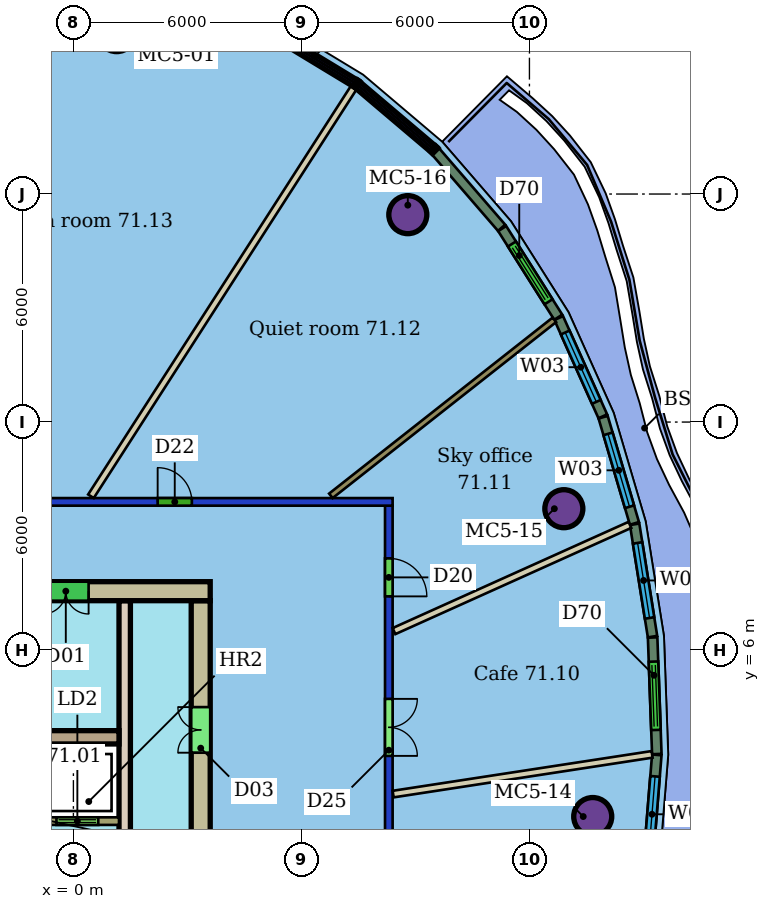
"""IFC4 building model, lengths in metres.
Left out: names, types, materials, properties, quantities, classifications, styles, units other than length and angle.
Written with IfcOpenShell. Run it as: python <this file> out.ifc"""

import sys

from ifc_helpers import new_model, si_unit, direction, frame, frame_2d, origin, origin_2d, place, context, subcontext, project, spatial, rectangle, hollow_circle, extrude, element, fill, save


model = new_model("IFC4")
c1 = context("Model", 3, precision=1e-05, world=origin(), true_north=direction((0.0, 1.0)))
c2 = subcontext(c1, "Body", "Model", "MODEL_VIEW")
j1 = project(units=[si_unit("LENGTHUNIT", "METRE"), si_unit("PLANEANGLEUNIT", "RADIAN")], contexts=[c1])
p1 = place(None, origin())
s1 = spatial("IfcSite", under=j1, at=p1, CompositionType="ELEMENT")
p2 = place(p1, origin())
s2 = spatial("IfcBuilding", under=s1, at=p2, CompositionType="ELEMENT")
p3 = place(p2, frame((0.0, 0.0, 286.5)))
s3 = spatial("IfcBuildingStorey", under=s2, at=p3, CompositionType="ELEMENT", Elevation=286.5)
for number, where, z_axis, x_axis in (
    (1, (13.666, 1.62, 0.0), (0.0, 0.0, 1.0), (1.0, 0.0, 0.0)),
    (2, (12.906, 9.72, 0.0), (0.0, 0.0, 1.0), (1.0, 0.0, 0.0)),
    (3, (8.8, 17.457, 0.0), (0.0, 0.0, 1.0), (1.0, 0.0, 0.0)),
):
    element("IfcColumn", number, at=place(p3, frame(where, z_axis=z_axis, x_axis=x_axis)), inside=s3, PredefinedType="COLUMN", context=c2, shape_type="SweptSolid", body=[
        extrude(hollow_circle(Radius=0.5, WallThickness=0.04, at=origin_2d()), origin(), (0.0, 0.0, 1.0), 3.45),
    ])
p4 = place(p3, frame((-20.4, 9.9, 0.0), z_axis=(0.0, 0.0, 1.0), x_axis=(1.0, 0.0, 0.0)))
e4 = element("IfcWall", 4, at=p4, inside=s3, PredefinedType="PARTITIONING", context=c2, shape_type="SweptSolid", body=[
    extrude(rectangle(XDim=28.8, YDim=0.2, at=frame_2d((14.4, 0.0))), origin(), (0.0, 0.0, 1.0), 3.1),
])
p5 = place(p4, frame((12.171, 0.0, 0.0)))
e5 = element("IfcOpeningElement", 5, at=p5, cuts=e4, PredefinedType="OPENING", context=c2, shape_type="SweptSolid", body=[
    extrude(rectangle(XDim=1.0, YDim=2.4, at=frame_2d((0.5, 1.2))), frame((0.0, 0.11, 0.0), z_axis=(0.0, -1.0, 0.0), x_axis=(1.0, 0.0, 0.0)), (0.0, 0.0, 1.0), 0.22),
])
p6 = place(p4, frame((6.068, 0.0, 0.0)))
e6 = element("IfcOpeningElement", 6, at=p6, cuts=e4, PredefinedType="OPENING", context=c2, shape_type="SweptSolid", body=[
    extrude(rectangle(XDim=1.8, YDim=2.4, at=frame_2d((0.9, 1.2))), frame((0.0, 0.11, 0.0), z_axis=(0.0, -1.0, 0.0), x_axis=(1.0, 0.0, 0.0)), (0.0, 0.0, 1.0), 0.22),
])
p7 = place(p4, frame((22.617, 0.0, 0.0)))
e7 = element("IfcOpeningElement", 7, at=p7, cuts=e4, PredefinedType="OPENING", context=c2, shape_type="SweptSolid", body=[
    extrude(rectangle(XDim=0.9, YDim=2.1, at=frame_2d((0.45, 1.05))), frame((0.0, 0.11, 0.0), z_axis=(0.0, -1.0, 0.0), x_axis=(1.0, 0.0, 0.0)), (0.0, 0.0, 1.0), 0.22),
])
p8 = place(p4, frame((18.45, 0.0, 0.0)))
e8 = element("IfcOpeningElement", 8, at=p8, cuts=e4, PredefinedType="OPENING", context=c2, shape_type="SweptSolid", body=[
    extrude(rectangle(XDim=1.0, YDim=2.1, at=frame_2d((0.5, 1.05))), frame((0.0, 0.11, 0.0), z_axis=(0.0, -1.0, 0.0), x_axis=(1.0, 0.0, 0.0)), (0.0, 0.0, 1.0), 0.22),
])
p9 = place(p3, frame((8.3, 9.8, 0.0), z_axis=(0.0, 0.0, 1.0), x_axis=(0.0, -1.0, 0.0)))
e9 = element("IfcWall", 9, at=p9, inside=s3, PredefinedType="PARTITIONING", context=c2, shape_type="SweptSolid", body=[
    extrude(rectangle(XDim=19.6, YDim=0.2, at=frame_2d((9.8, 0.0))), origin(), (0.0, 0.0, 1.0), 3.1),
])
p10 = place(p9, frame((14.011, 0.0, 0.0)))
e10 = element("IfcOpeningElement", 10, at=p10, cuts=e9, PredefinedType="OPENING", context=c2, shape_type="SweptSolid", body=[
    extrude(rectangle(XDim=1.5, YDim=2.1, at=frame_2d((0.75, 1.05))), frame((0.0, 0.11, 0.0), z_axis=(0.0, -1.0, 0.0), x_axis=(1.0, 0.0, 0.0)), (0.0, 0.0, 1.0), 0.22),
])
p11 = place(p9, frame((8.798, 0.0, 0.0)))
e11 = element("IfcOpeningElement", 11, at=p11, cuts=e9, PredefinedType="OPENING", context=c2, shape_type="SweptSolid", body=[
    extrude(rectangle(XDim=0.9, YDim=2.1, at=frame_2d((0.45, 1.05))), frame((0.0, 0.11, 0.0), z_axis=(0.0, -1.0, 0.0), x_axis=(1.0, 0.0, 0.0)), (0.0, 0.0, 1.0), 0.22),
])
p12 = place(p9, frame((5.084, 0.0, 0.0)))
e12 = element("IfcOpeningElement", 12, at=p12, cuts=e9, PredefinedType="OPENING", context=c2, shape_type="SweptSolid", body=[
    extrude(rectangle(XDim=1.5, YDim=2.4, at=frame_2d((0.75, 1.2))), frame((0.0, 0.11, 0.0), z_axis=(0.0, -1.0, 0.0), x_axis=(1.0, 0.0, 0.0)), (0.0, 0.0, 1.0), 0.22),
])
p13 = place(p9, frame((1.387, 0.0, 0.0)))
e13 = element("IfcOpeningElement", 13, at=p13, cuts=e9, PredefinedType="OPENING", context=c2, shape_type="SweptSolid", body=[
    extrude(rectangle(XDim=1.0, YDim=2.1, at=frame_2d((0.5, 1.05))), frame((0.0, 0.11, 0.0), z_axis=(0.0, -1.0, 0.0), x_axis=(1.0, 0.0, 0.0)), (0.0, 0.0, 1.0), 0.22),
])
p14 = place(p3, frame((15.228, 3.256, 0.0), z_axis=(0.0, 0.0, 1.0), x_axis=(-0.988435478187, -0.151642030654, 0.0)))
e14 = element("IfcWall", 14, at=p14, inside=s3, PredefinedType="PARTITIONING", context=c2, shape_type="SweptSolid", body=[
    extrude(rectangle(XDim=6.894, YDim=0.175, at=frame_2d((3.447, 0.0))), origin(), (0.0, 0.0, 1.0), 3.45),
])
p15 = place(p3, frame((14.644, 9.295, 0.0), z_axis=(0.0, 0.0, 1.0), x_axis=(-0.911835601306, -0.410555521447, 0.0)))
e15 = element("IfcWall", 15, at=p15, inside=s3, PredefinedType="PARTITIONING", context=c2, shape_type="SweptSolid", body=[
    extrude(rectangle(XDim=6.808, YDim=0.175, at=frame_2d((3.404, 0.0))), origin(), (0.0, 0.0, 1.0), 3.45),
])
p16 = place(p3, frame((12.656, 14.689, 0.0), z_axis=(0.0, 0.0, 1.0), x_axis=(-0.78567951845, -0.618633731936, 0.0)))
e16 = element("IfcWall", 16, at=p16, inside=s3, PredefinedType="PARTITIONING", context=c2, shape_type="SweptSolid", body=[
    extrude(rectangle(XDim=7.484, YDim=0.15, at=frame_2d((3.742, 0.0))), origin(), (0.0, 0.0, 1.0), 3.45),
])
p17 = place(p3, frame((7.375, 20.796, 0.0), z_axis=(0.0, 0.0, 1.0), x_axis=(-0.540918824155, -0.841074803852, 0.0)))
e17 = element("IfcWall", 17, at=p17, inside=s3, PredefinedType="PARTITIONING", context=c2, shape_type="SweptSolid", body=[
    extrude(rectangle(XDim=12.78, YDim=0.175, at=frame_2d((6.39, 0.0))), origin(), (0.0, 0.0, 1.0), 3.45),
])
p18 = place(p3, frame((15.098, 0.118, 0.0), z_axis=(0.0, 0.0, 1.0), x_axis=(0.080847238515, 0.996726504125, 0.0)))
e18 = element("IfcWall", 18, at=p18, inside=s3, PredefinedType="SOLIDWALL", context=c2, shape_type="SweptSolid", body=[
    extrude(rectangle(XDim=3.135, YDim=0.25, at=frame_2d((1.567, 0.0))), origin(), (0.0, 0.0, 1.0), 3.15),
])
p19 = place(p18, frame((0.567, 0.0, 0.9)))
e19 = element("IfcOpeningElement", 19, at=p19, cuts=e18, PredefinedType="OPENING", context=c2, shape_type="SweptSolid", body=[
    extrude(rectangle(XDim=2.0, YDim=2.1, at=frame_2d((1.0, 1.05))), frame((0.0, 0.135, 0.0), z_axis=(0.0, -1.0, 0.0), x_axis=(1.0, 0.0, 0.0)), (0.0, 0.0, 1.0), 0.27),
])
p20 = place(p3, frame((15.352, 3.265, 0.0), z_axis=(0.0, 0.0, 1.0), x_axis=(-0.035961121069, 0.999353189704, 0.0)))
e20 = element("IfcWall", 20, at=p20, inside=s3, PredefinedType="SOLIDWALL", context=c2, shape_type="SweptSolid", body=[
    extrude(rectangle(XDim=3.069, YDim=0.25, at=frame_2d((1.534, 0.0))), origin(), (0.0, 0.0, 1.0), 3.15),
])
p21 = place(p20, frame((0.634, 0.0, 0.0)))
e21 = element("IfcOpeningElement", 21, at=p21, cuts=e20, PredefinedType="OPENING", context=c2, shape_type="SweptSolid", body=[
    extrude(rectangle(XDim=1.8, YDim=2.4, at=frame_2d((0.9, 1.2))), frame((0.0, 0.135, 0.0), z_axis=(0.0, -1.0, 0.0), x_axis=(1.0, 0.0, 0.0)), (0.0, 0.0, 1.0), 0.27),
])
p22 = place(p3, frame((15.24, 6.354, 0.0), z_axis=(0.0, 0.0, 1.0), x_axis=(-0.157503758702, 0.987518387674, 0.0)))
e22 = element("IfcWall", 22, at=p22, inside=s3, PredefinedType="SOLIDWALL", context=c2, shape_type="SweptSolid", body=[
    extrude(rectangle(XDim=2.993, YDim=0.25, at=frame_2d((1.497, 0.0))), origin(), (0.0, 0.0, 1.0), 3.15),
])
p23 = place(p22, frame((0.497, 0.0, 0.9)))
e23 = element("IfcOpeningElement", 23, at=p23, cuts=e22, PredefinedType="OPENING", context=c2, shape_type="SweptSolid", body=[
    extrude(rectangle(XDim=2.0, YDim=2.1, at=frame_2d((1.0, 1.05))), frame((0.0, 0.135, 0.0), z_axis=(0.0, -1.0, 0.0), x_axis=(1.0, 0.0, 0.0)), (0.0, 0.0, 1.0), 0.27),
])
p24 = place(p3, frame((14.763, 9.333, 0.0), z_axis=(0.0, 0.0, 1.0), x_axis=(-0.282592797693, 0.959239965124, 0.0)))
e24 = element("IfcWall", 24, at=p24, inside=s3, PredefinedType="SOLIDWALL", context=c2, shape_type="SweptSolid", body=[
    extrude(rectangle(XDim=2.913, YDim=0.25, at=frame_2d((1.457, 0.0))), origin(), (0.0, 0.0, 1.0), 3.15),
])
p25 = place(p24, frame((0.457, 0.0, 0.9)))
e25 = element("IfcOpeningElement", 25, at=p25, cuts=e24, PredefinedType="OPENING", context=c2, shape_type="SweptSolid", body=[
    extrude(rectangle(XDim=2.0, YDim=2.1, at=frame_2d((1.0, 1.05))), frame((0.0, 0.135, 0.0), z_axis=(0.0, -1.0, 0.0), x_axis=(1.0, 0.0, 0.0)), (0.0, 0.0, 1.0), 0.27),
])
p26 = place(p3, frame((13.931, 12.151, 0.0), z_axis=(0.0, 0.0, 1.0), x_axis=(-0.409357706151, 0.91237397399, 0.0)))
e26 = element("IfcWall", 26, at=p26, inside=s3, PredefinedType="SOLIDWALL", context=c2, shape_type="SweptSolid", body=[
    extrude(rectangle(XDim=2.833, YDim=0.25, at=frame_2d((1.417, 0.0))), origin(), (0.0, 0.0, 1.0), 3.15),
])
p27 = place(p26, frame((0.417, 0.0, 0.9)))
e27 = element("IfcOpeningElement", 27, at=p27, cuts=e26, PredefinedType="OPENING", context=c2, shape_type="SweptSolid", body=[
    extrude(rectangle(XDim=2.0, YDim=2.1, at=frame_2d((1.0, 1.05))), frame((0.0, 0.135, 0.0), z_axis=(0.0, -1.0, 0.0), x_axis=(1.0, 0.0, 0.0)), (0.0, 0.0, 1.0), 0.27),
])
p28 = place(p3, frame((12.759, 14.759, 0.0), z_axis=(0.0, 0.0, 1.0), x_axis=(-0.534618506931, 0.845093516747, 0.0)))
e28 = element("IfcWall", 28, at=p28, inside=s3, PredefinedType="SOLIDWALL", context=c2, shape_type="SweptSolid", body=[
    extrude(rectangle(XDim=2.76, YDim=0.25, at=frame_2d((1.38, 0.0))), origin(), (0.0, 0.0, 1.0), 3.15),
])
p29 = place(p28, frame((0.48, 0.0, 0.0)))
e29 = element("IfcOpeningElement", 29, at=p29, cuts=e28, PredefinedType="OPENING", context=c2, shape_type="SweptSolid", body=[
    extrude(rectangle(XDim=1.8, YDim=2.4, at=frame_2d((0.9, 1.2))), frame((0.0, 0.135, 0.0), z_axis=(0.0, -1.0, 0.0), x_axis=(1.0, 0.0, 0.0)), (0.0, 0.0, 1.0), 0.27),
])
p30 = place(p3, frame((11.267, 17.113, 0.0), z_axis=(0.0, 0.0, 1.0), x_axis=(-0.654220123959, 0.756304191055, 0.0)))
e30 = element("IfcWall", 30, at=p30, inside=s3, PredefinedType="SOLIDWALL", context=c2, shape_type="SweptSolid", body=[
    extrude(rectangle(XDim=2.657, YDim=0.25, at=frame_2d((1.329, 0.0))), origin(), (0.0, 0.0, 1.0), 3.15),
])
p31 = place(p3, frame((3.6, 7.55, 0.0), z_axis=(0.0, 0.0, 1.0), x_axis=(-1.0, 0.0, 0.0)))
e31 = element("IfcWall", 31, at=p31, inside=s3, PredefinedType="SHEAR", context=c2, shape_type="SweptSolid", body=[
    extrude(rectangle(XDim=9.6, YDim=0.5, at=frame_2d((4.8, 0.0))), origin(), (0.0, 0.0, 1.0), 3.3),
])
p32 = place(p31, frame((3.2, 0.0, 0.0)))
e32 = element("IfcOpeningElement", 32, at=p32, cuts=e31, PredefinedType="OPENING", context=c2, shape_type="SweptSolid", body=[
    extrude(rectangle(XDim=1.2, YDim=2.1, at=frame_2d((0.6, 1.05))), frame((0.0, 0.26, 0.0), z_axis=(0.0, -1.0, 0.0), x_axis=(1.0, 0.0, 0.0)), (0.0, 0.0, 1.0), 0.52),
])
p33 = place(p3, frame((3.35, -7.3, 0.0), z_axis=(0.0, 0.0, 1.0), x_axis=(0.0, 1.0, 0.0)))
e33 = element("IfcWall", 33, at=p33, inside=s3, PredefinedType="SHEAR", context=c2, shape_type="SweptSolid", body=[
    extrude(rectangle(XDim=14.6, YDim=0.5, at=frame_2d((7.3, 0.0))), origin(), (0.0, 0.0, 1.0), 3.3),
])
p34 = place(p33, frame((2.8, 0.0, 0.0)))
e34 = element("IfcOpeningElement", 34, at=p34, cuts=e33, PredefinedType="OPENING", context=c2, shape_type="SweptSolid", body=[
    extrude(rectangle(XDim=1.2, YDim=2.1, at=frame_2d((0.6, 1.05))), frame((0.0, 0.26, 0.0), z_axis=(0.0, -1.0, 0.0), x_axis=(1.0, 0.0, 0.0)), (0.0, 0.0, 1.0), 0.52),
])
p35 = place(p33, frame((10.6, 0.0, 0.0)))
e35 = element("IfcOpeningElement", 35, at=p35, cuts=e33, PredefinedType="OPENING", context=c2, shape_type="SweptSolid", body=[
    extrude(rectangle(XDim=1.2, YDim=2.1, at=frame_2d((0.6, 1.05))), frame((0.0, 0.26, 0.0), z_axis=(0.0, -1.0, 0.0), x_axis=(1.0, 0.0, 0.0)), (0.0, 0.0, 1.0), 0.52),
])
p36 = place(p3, frame((-6.0, 3.705, 0.0), z_axis=(0.0, 0.0, 1.0), x_axis=(1.0, 0.0, 0.0)))
e36 = element("IfcWall", 36, at=p36, inside=s3, PredefinedType="SHEAR", context=c2, shape_type="SweptSolid", body=[
    extrude(rectangle(XDim=7.2, YDim=0.35, at=frame_2d((3.6, 0.0))), origin(), (0.0, 0.0, 1.0), 3.3),
])
p37 = place(p3, frame((1.35, -7.3, 0.0), z_axis=(0.0, 0.0, 1.0), x_axis=(0.0, 1.0, 0.0)))
e37 = element("IfcWall", 37, at=p37, inside=s3, PredefinedType="SHEAR", context=c2, shape_type="SweptSolid", body=[
    extrude(rectangle(XDim=14.6, YDim=0.3, at=frame_2d((7.3, 0.0))), origin(), (0.0, 0.0, 1.0), 3.3),
])
p38 = place(p37, frame((1.21, 0.0, 0.0)))
e38 = element("IfcOpeningElement", 38, at=p38, cuts=e37, PredefinedType="OPENING", context=c2, shape_type="SweptSolid", body=[
    extrude(rectangle(XDim=1.0, YDim=2.1, at=frame_2d((0.5, 1.05))), frame((0.0, 0.16, 0.0), z_axis=(0.0, -1.0, 0.0), x_axis=(1.0, 0.0, 0.0)), (0.0, 0.0, 1.0), 0.32),
])
p39 = place(p37, frame((6.55, 0.0, 0.0)))
e39 = element("IfcOpeningElement", 39, at=p39, cuts=e37, PredefinedType="OPENING", context=c2, shape_type="SweptSolid", body=[
    extrude(rectangle(XDim=1.5, YDim=2.1, at=frame_2d((0.75, 1.05))), frame((0.0, 0.16, 0.0), z_axis=(0.0, -1.0, 0.0), x_axis=(1.0, 0.0, 0.0)), (0.0, 0.0, 1.0), 0.32),
])
p40 = place(p3, frame((-13.2, 1.5, 0.0), z_axis=(0.0, 0.0, 1.0), x_axis=(1.0, 0.0, 0.0)))
e40 = element("IfcWall", 40, at=p40, inside=s3, PredefinedType="SHEAR", context=c2, shape_type="SweptSolid", body=[
    extrude(rectangle(XDim=14.4, YDim=0.2, at=frame_2d((7.2, 0.0))), origin(), (0.0, 0.0, 1.0), 3.3),
])
p41 = place(p40, frame((10.312, 0.0, 0.0)))
e41 = element("IfcOpeningElement", 41, at=p41, cuts=e40, PredefinedType="OPENING", context=c2, shape_type="SweptSolid", body=[
    extrude(rectangle(XDim=1.1, YDim=2.1, at=frame_2d((0.55, 1.05))), frame((0.0, 0.11, 0.0), z_axis=(0.0, -1.0, 0.0), x_axis=(1.0, 0.0, 0.0)), (0.0, 0.0, 1.0), 0.22),
])
p42 = place(p40, frame((12.754, 0.0, 0.0)))
e42 = element("IfcOpeningElement", 42, at=p42, cuts=e40, PredefinedType="OPENING", context=c2, shape_type="SweptSolid", body=[
    extrude(rectangle(XDim=1.1, YDim=2.1, at=frame_2d((0.55, 1.05))), frame((0.0, 0.11, 0.0), z_axis=(0.0, -1.0, 0.0), x_axis=(1.0, 0.0, 0.0)), (0.0, 0.0, 1.0), 0.22),
])
p43 = place(p40, frame((0.15, 0.0, 0.0)))
e43 = element("IfcOpeningElement", 43, at=p43, cuts=e40, PredefinedType="OPENING", context=c2, shape_type="SweptSolid", body=[
    extrude(rectangle(XDim=0.9, YDim=2.1, at=frame_2d((0.45, 1.05))), frame((0.0, 0.11, 0.0), z_axis=(0.0, -1.0, 0.0), x_axis=(1.0, 0.0, 0.0)), (0.0, 0.0, 1.0), 0.22),
])
p44 = place(p40, frame((4.222, 0.0, 0.0)))
e44 = element("IfcOpeningElement", 44, at=p44, cuts=e40, PredefinedType="OPENING", context=c2, shape_type="SweptSolid", body=[
    extrude(rectangle(XDim=1.0, YDim=2.1, at=frame_2d((0.5, 1.05))), frame((0.0, 0.11, 0.0), z_axis=(0.0, -1.0, 0.0), x_axis=(1.0, 0.0, 0.0)), (0.0, 0.0, 1.0), 0.22),
])
p45 = place(p40, frame((8.367, 0.0, 0.0)))
e45 = element("IfcOpeningElement", 45, at=p45, cuts=e40, PredefinedType="OPENING", context=c2, shape_type="SweptSolid", body=[
    extrude(rectangle(XDim=1.0, YDim=2.1, at=frame_2d((0.5, 1.05))), frame((0.0, 0.11, 0.0), z_axis=(0.0, -1.0, 0.0), x_axis=(1.0, 0.0, 0.0)), (0.0, 0.0, 1.0), 0.22),
])
p46 = place(p12, origin())
e46 = element("IfcDoor", 46, at=p46, inside=s3, OperationType="DOUBLE_DOOR_SINGLE_SWING", PredefinedType="DOOR", context=c2, shape_type="SweptSolid", body=[
    extrude(rectangle(XDim=1.5, YDim=2.4, at=frame_2d((0.75, 1.2))), frame((0.0, 0.025, 0.0), z_axis=(0.0, -1.0, 0.0), x_axis=(1.0, 0.0, 0.0)), (0.0, 0.0, 1.0), 0.05),
])
fill(e12, e46)
p47 = place(p13, origin())
e47 = element("IfcDoor", 47, at=p47, inside=s3, OperationType="SINGLE_SWING_RIGHT", PredefinedType="DOOR", context=c2, shape_type="SweptSolid", body=[
    extrude(rectangle(XDim=1.0, YDim=2.1, at=frame_2d((0.5, 1.05))), frame((0.0, 0.025, 0.0), z_axis=(0.0, -1.0, 0.0), x_axis=(1.0, 0.0, 0.0)), (0.0, 0.0, 1.0), 0.05),
])
fill(e13, e47)
p48 = place(p7, origin())
e48 = element("IfcDoor", 48, at=p48, inside=s3, OperationType="SINGLE_SWING_LEFT", PredefinedType="DOOR", context=c2, shape_type="SweptSolid", body=[
    extrude(rectangle(XDim=0.9, YDim=2.1, at=frame_2d((0.45, 1.05))), frame((0.0, 0.025, 0.0), z_axis=(0.0, -1.0, 0.0), x_axis=(1.0, 0.0, 0.0)), (0.0, 0.0, 1.0), 0.05),
])
fill(e7, e48)
p49 = place(p19, origin())
e49 = element("IfcWindow", 49, at=p49, inside=s3, PartitioningType="SINGLE_PANEL", PredefinedType="WINDOW", context=c2, shape_type="SweptSolid", body=[
    extrude(rectangle(XDim=2.0, YDim=2.1, at=frame_2d((1.0, 1.05))), frame((0.0, 0.03, 0.0), z_axis=(0.0, -1.0, 0.0), x_axis=(1.0, 0.0, 0.0)), (0.0, 0.0, 1.0), 0.06),
])
fill(e19, e49)
p50 = place(p21, origin())
e50 = element("IfcDoor", 50, at=p50, inside=s3, OperationType="DOUBLE_DOOR_SLIDING", PredefinedType="DOOR", context=c2, shape_type="SweptSolid", body=[
    extrude(rectangle(XDim=1.8, YDim=2.4, at=frame_2d((0.9, 1.2))), frame((0.0, 0.025, 0.0), z_axis=(0.0, -1.0, 0.0), x_axis=(1.0, 0.0, 0.0)), (0.0, 0.0, 1.0), 0.05),
])
fill(e21, e50)
p51 = place(p23, origin())
e51 = element("IfcWindow", 51, at=p51, inside=s3, PartitioningType="SINGLE_PANEL", PredefinedType="WINDOW", context=c2, shape_type="SweptSolid", body=[
    extrude(rectangle(XDim=2.0, YDim=2.1, at=frame_2d((1.0, 1.05))), frame((0.0, 0.03, 0.0), z_axis=(0.0, -1.0, 0.0), x_axis=(1.0, 0.0, 0.0)), (0.0, 0.0, 1.0), 0.06),
])
fill(e23, e51)
p52 = place(p25, origin())
e52 = element("IfcWindow", 52, at=p52, inside=s3, PartitioningType="SINGLE_PANEL", PredefinedType="WINDOW", context=c2, shape_type="SweptSolid", body=[
    extrude(rectangle(XDim=2.0, YDim=2.1, at=frame_2d((1.0, 1.05))), frame((0.0, 0.03, 0.0), z_axis=(0.0, -1.0, 0.0), x_axis=(1.0, 0.0, 0.0)), (0.0, 0.0, 1.0), 0.06),
])
fill(e25, e52)
p53 = place(p27, origin())
e53 = element("IfcWindow", 53, at=p53, inside=s3, PartitioningType="SINGLE_PANEL", PredefinedType="WINDOW", context=c2, shape_type="SweptSolid", body=[
    extrude(rectangle(XDim=2.0, YDim=2.1, at=frame_2d((1.0, 1.05))), frame((0.0, 0.03, 0.0), z_axis=(0.0, -1.0, 0.0), x_axis=(1.0, 0.0, 0.0)), (0.0, 0.0, 1.0), 0.06),
])
fill(e27, e53)
p54 = place(p29, origin())
e54 = element("IfcDoor", 54, at=p54, inside=s3, OperationType="DOUBLE_DOOR_SLIDING", PredefinedType="DOOR", context=c2, shape_type="SweptSolid", body=[
    extrude(rectangle(XDim=1.8, YDim=2.4, at=frame_2d((0.9, 1.2))), frame((0.0, 0.025, 0.0), z_axis=(0.0, -1.0, 0.0), x_axis=(1.0, 0.0, 0.0)), (0.0, 0.0, 1.0), 0.05),
])
fill(e29, e54)
p55 = place(p32, origin())
e55 = element("IfcDoor", 55, at=p55, inside=s3, OperationType="DOUBLE_DOOR_SINGLE_SWING", PredefinedType="NOTDEFINED", context=c2, shape_type="SweptSolid", body=[
    extrude(rectangle(XDim=1.2, YDim=2.1, at=frame_2d((0.6, 1.05))), frame((0.0, 0.025, 0.0), z_axis=(0.0, -1.0, 0.0), x_axis=(1.0, 0.0, 0.0)), (0.0, 0.0, 1.0), 0.05),
])
fill(e32, e55)
p56 = place(p35, origin())
e56 = element("IfcDoor", 56, at=p56, inside=s3, OperationType="DOUBLE_DOOR_SINGLE_SWING", PredefinedType="NOTDEFINED", context=c2, shape_type="SweptSolid", body=[
    extrude(rectangle(XDim=1.2, YDim=2.1, at=frame_2d((0.6, 1.05))), frame((0.0, 0.025, 0.0), z_axis=(0.0, -1.0, 0.0), x_axis=(1.0, 0.0, 0.0)), (0.0, 0.0, 1.0), 0.05),
])
fill(e35, e56)
p57 = place(p42, origin())
e57 = element("IfcDoor", 57, at=p57, inside=s3, OperationType="DOUBLE_DOOR_SLIDING", PredefinedType="NOTDEFINED", context=c2, shape_type="SweptSolid", body=[
    extrude(rectangle(XDim=1.1, YDim=2.1, at=frame_2d((0.55, 1.05))), frame((0.0, 0.025, 0.0), z_axis=(0.0, -1.0, 0.0), x_axis=(1.0, 0.0, 0.0)), (0.0, 0.0, 1.0), 0.05),
])
fill(e42, e57)
save(model, sys.argv[1])
